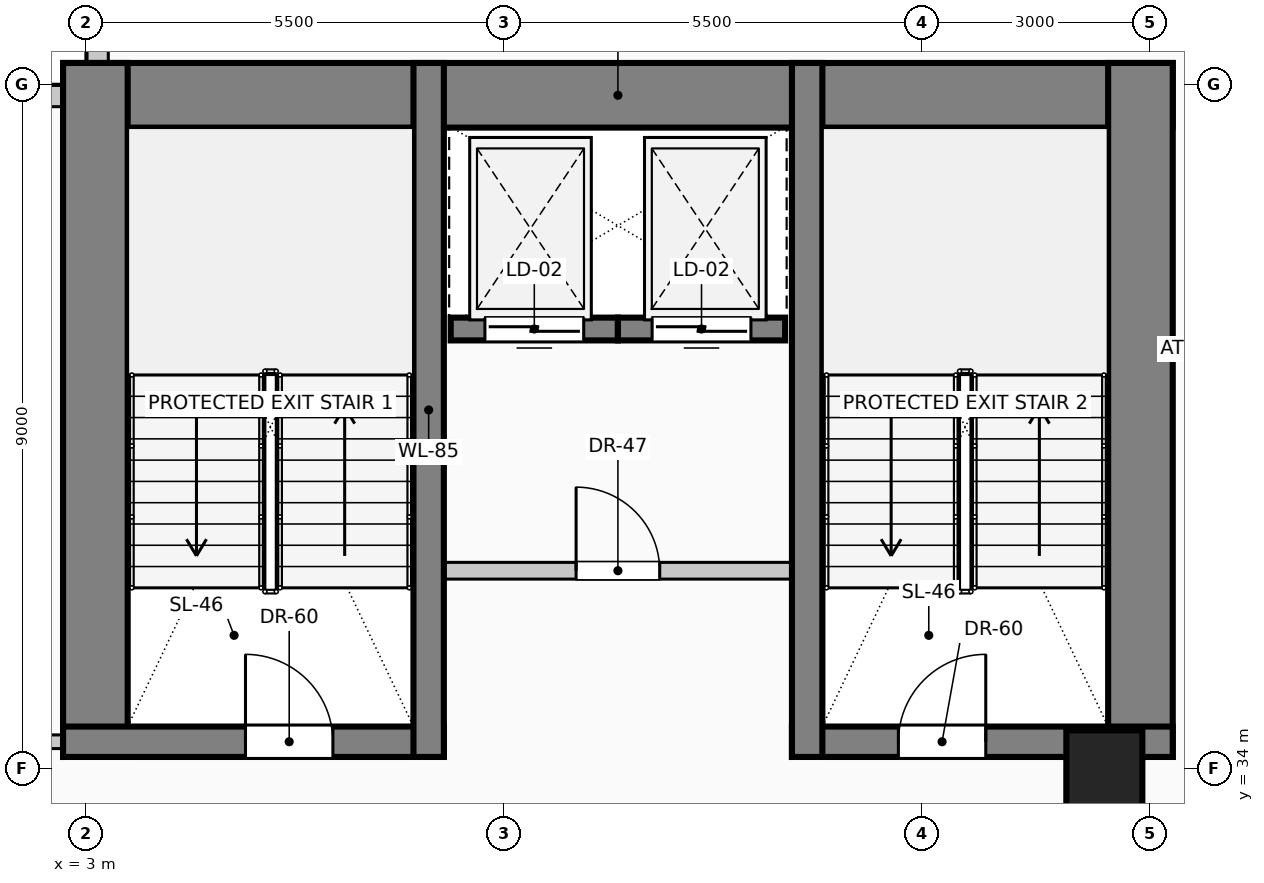
"""IFC4 building model, lengths in metres.
Left out: names, types, materials, properties, quantities, classifications, styles, units other than length and angle.
Written with IfcOpenShell. Run it as: python <this file> out.ifc"""

import sys

from ifc_helpers import new_model, si_unit, direction, frame, frame_2d, origin, origin_2d, place, context, subcontext, project, spatial, rectangle, circle, extrude, element, fill, save


model = new_model("IFC4")
c1 = context("Model", 3, precision=1e-05, world=origin(), true_north=direction((0.0, 1.0)))
c2 = subcontext(c1, "Body", "Model", "MODEL_VIEW")
j1 = project(units=[si_unit("LENGTHUNIT", "METRE"), si_unit("PLANEANGLEUNIT", "RADIAN")], contexts=[c1])
p1 = place(None, origin())
s1 = spatial("IfcSite", under=j1, at=p1, CompositionType="ELEMENT")
p2 = place(p1, origin())
s2 = spatial("IfcBuilding", under=s1, at=p2, CompositionType="ELEMENT")
p3 = place(p2, frame((0.0, 0.0, 132.6)))
s3 = spatial("IfcBuildingStorey", under=s2, at=p3, CompositionType="ELEMENT", Elevation=132.6)
p4 = place(p3, frame((2.7, 42.855, 0.0), z_axis=(0.0, 0.0, 1.0), x_axis=(1.0, 0.0, 0.0)))
e1 = element("IfcWall", 1, at=p4, inside=s3, PredefinedType="SHEAR", context=c2, shape_type="SweptSolid", body=[
    extrude(rectangle(XDim=14.6, YDim=0.85, at=frame_2d((7.3, 0.0))), origin(), (0.0, 0.0, 1.0), 4.0),
])
for number, where, z_axis, x_axis in (
    (2, (3.125, 34.15, 0.0), (0.0, 0.0, 1.0), (0.0, 1.0, 0.0)),
    (3, (16.875, 34.15, 0.0), (0.0, 0.0, 1.0), (0.0, 1.0, 0.0)),
):
    element("IfcWall", number, at=place(p3, frame(where, z_axis=z_axis, x_axis=x_axis)), inside=s3, PredefinedType="SHEAR", context=c2, shape_type="SweptSolid", body=[
        extrude(rectangle(XDim=9.13, YDim=0.85, at=frame_2d((4.565, 0.0))), origin(), (0.0, 0.0, 1.0), 4.0),
    ])
p5 = place(p3, frame((2.7, 34.35, 0.0), z_axis=(0.0, 0.0, 1.0), x_axis=(1.0, 0.0, 0.0)))
e4 = element("IfcWall", 4, at=p5, inside=s3, PredefinedType="SHEAR", context=c2, shape_type="SweptSolid", body=[
    extrude(rectangle(XDim=5.01, YDim=0.4, at=frame_2d((2.505, 0.0))), origin(), (0.0, 0.0, 1.0), 4.0),
])
p6 = place(p5, frame((2.4, 0.0, 0.0)))
e5 = element("IfcOpeningElement", 5, at=p6, cuts=e4, PredefinedType="OPENING", context=c2, shape_type="SweptSolid", body=[
    extrude(rectangle(XDim=1.15, YDim=2.2, at=frame_2d((0.575, 1.1))), frame((0.0, 0.21, 0.0), z_axis=(0.0, -1.0, 0.0), x_axis=(1.0, 0.0, 0.0)), (0.0, 0.0, 1.0), 0.42),
])
p7 = place(p3, frame((12.29, 34.35, 0.0), z_axis=(0.0, 0.0, 1.0), x_axis=(1.0, 0.0, 0.0)))
e6 = element("IfcWall", 6, at=p7, inside=s3, PredefinedType="SHEAR", context=c2, shape_type="SweptSolid", body=[
    extrude(rectangle(XDim=5.01, YDim=0.4, at=frame_2d((2.505, 0.0))), origin(), (0.0, 0.0, 1.0), 4.0),
])
p8 = place(p7, frame((1.4, 0.0, 0.0)))
e7 = element("IfcOpeningElement", 7, at=p8, cuts=e6, PredefinedType="OPENING", context=c2, shape_type="SweptSolid", body=[
    extrude(rectangle(XDim=1.15, YDim=2.2, at=frame_2d((0.575, 1.1))), frame((0.0, 0.21, 0.0), z_axis=(0.0, -1.0, 0.0), x_axis=(1.0, 0.0, 0.0)), (0.0, 0.0, 1.0), 0.42),
])
for number, where, z_axis, x_axis in (
    (8, (7.51, 34.15, 0.0), (0.0, 0.0, 1.0), (0.0, 1.0, 0.0)),
    (9, (12.49, 34.15, 0.0), (0.0, 0.0, 1.0), (0.0, 1.0, 0.0)),
):
    element("IfcWall", number, at=place(p3, frame(where, z_axis=z_axis, x_axis=x_axis)), inside=s3, PredefinedType="SHEAR", context=c2, shape_type="SweptSolid", body=[
        extrude(rectangle(XDim=9.13, YDim=0.4, at=frame_2d((4.565, 0.0))), origin(), (0.0, 0.0, 1.0), 4.0),
    ])
p9 = place(p3, frame((16.4, 34.0, 0.0), z_axis=(0.0, 0.0, 1.0), x_axis=(1.0, 0.0, 0.0)))
e10 = element("IfcColumn", 10, at=p9, inside=s3, PredefinedType="COLUMN", context=c2, shape_type="SweptSolid", body=[
    extrude(circle(Radius=0.5, at=origin_2d()), origin(), (0.0, 0.0, 1.0), 4.0),
])
p10 = place(p3, frame((0.6, 42.845, 0.0), z_axis=(0.0, 0.0, 1.0), x_axis=(1.0, 0.0, 0.0)))
e11 = element("IfcWall", 11, at=p10, inside=s3, PredefinedType="SOLIDWALL", context=c2, shape_type="SweptSolid", body=[
    extrude(rectangle(XDim=2.095, YDim=0.28, at=frame_2d((1.047, 0.0))), origin(), (0.0, 0.0, 1.0), 3.725),
])
p11 = place(p3, frame((3.155, 43.285, 0.0), z_axis=(0.0, 0.0, 1.0), x_axis=(0.0, 1.0, 0.0)))
e12 = element("IfcWall", 12, at=p11, inside=s3, PredefinedType="SOLIDWALL", context=c2, shape_type="SweptSolid", body=[
    extrude(rectangle(XDim=2.115, YDim=0.28, at=frame_2d((1.058, 0.0))), origin(), (0.0, 0.0, 1.0), 3.725),
])
p12 = place(p3, frame((10.0, 39.78, 0.0), z_axis=(0.0, 0.0, 1.0), x_axis=(-1.0, 0.0, 0.0)))
e13 = element("IfcWall", 13, at=p12, inside=s3, PredefinedType="SOLIDWALL", context=c2, shape_type="SweptSolid", body=[
    extrude(rectangle(XDim=2.2, YDim=0.3, at=frame_2d((1.1, 0.0))), origin(), (0.0, 0.0, 1.0), 4.0),
])
p13 = place(p12, frame((0.45, 0.0, 0.0)))
e14 = element("IfcOpeningElement", 14, at=p13, cuts=e13, PredefinedType="OPENING", context=c2, shape_type="SweptSolid", body=[
    extrude(rectangle(XDim=1.3, YDim=2.25, at=frame_2d((0.65, 1.125))), frame((0.0, 0.16, 0.0), z_axis=(0.0, -1.0, 0.0), x_axis=(1.0, 0.0, 0.0)), (0.0, 0.0, 1.0), 0.32),
])
p14 = place(p3, frame((12.2, 39.78, 0.0), z_axis=(0.0, 0.0, 1.0), x_axis=(-1.0, 0.0, 0.0)))
e15 = element("IfcWall", 15, at=p14, inside=s3, PredefinedType="SOLIDWALL", context=c2, shape_type="SweptSolid", body=[
    extrude(rectangle(XDim=2.2, YDim=0.3, at=frame_2d((1.1, 0.0))), origin(), (0.0, 0.0, 1.0), 4.0),
])
p15 = place(p14, frame((0.45, 0.0, 0.0)))
e16 = element("IfcOpeningElement", 16, at=p15, cuts=e15, PredefinedType="OPENING", context=c2, shape_type="SweptSolid", body=[
    extrude(rectangle(XDim=1.3, YDim=2.25, at=frame_2d((0.65, 1.125))), frame((0.0, 0.16, 0.0), z_axis=(0.0, -1.0, 0.0), x_axis=(1.0, 0.0, 0.0)), (0.0, 0.0, 1.0), 0.32),
])
p16 = place(p3, frame((7.51, 36.6, 0.0), z_axis=(0.0, 0.0, 1.0), x_axis=(1.0, 0.0, 0.0)))
e17 = element("IfcWall", 17, at=p16, inside=s3, PredefinedType="PARTITIONING", context=c2, shape_type="SweptSolid", body=[
    extrude(rectangle(XDim=4.98, YDim=0.22, at=frame_2d((2.49, 0.0))), origin(), (0.0, 0.0, 1.0), 3.725),
])
p17 = place(p16, frame((1.94, 0.0, 0.0)))
e18 = element("IfcOpeningElement", 18, at=p17, cuts=e17, PredefinedType="OPENING", context=c2, shape_type="SweptSolid", body=[
    extrude(rectangle(XDim=1.1, YDim=2.2, at=frame_2d((0.55, 1.1))), frame((0.0, 0.12, 0.0), z_axis=(0.0, -1.0, 0.0), x_axis=(1.0, 0.0, 0.0)), (0.0, 0.0, 1.0), 0.24),
])
p18 = place(p3, frame((1.175, 34.35, 0.0), z_axis=(0.0, 0.0, 1.0), x_axis=(1.0, 0.0, 0.0)))
e19 = element("IfcWall", 19, at=p18, inside=s3, PredefinedType="PARTITIONING", context=c2, shape_type="SweptSolid", body=[
    extrude(rectangle(XDim=1.525, YDim=0.18, at=frame_2d((0.762, 0.0))), origin(), (0.0, 0.0, 1.0), 3.725),
])
p19 = place(p13, origin())
e20 = element("IfcDoor", 20, at=p19, inside=s3, OperationType="SLIDING_TO_LEFT", PredefinedType="DOOR", context=c2, shape_type="SweptSolid", body=[
    extrude(rectangle(XDim=1.3, YDim=2.25, at=frame_2d((0.65, 1.125))), frame((0.0, 0.025, 0.0), z_axis=(0.0, -1.0, 0.0), x_axis=(1.0, 0.0, 0.0)), (0.0, 0.0, 1.0), 0.05),
])
fill(e14, e20)
p20 = place(p15, origin())
e21 = element("IfcDoor", 21, at=p20, inside=s3, OperationType="SLIDING_TO_RIGHT", PredefinedType="DOOR", context=c2, shape_type="SweptSolid", body=[
    extrude(rectangle(XDim=1.3, YDim=2.25, at=frame_2d((0.65, 1.125))), frame((0.0, 0.025, 0.0), z_axis=(0.0, -1.0, 0.0), x_axis=(1.0, 0.0, 0.0)), (0.0, 0.0, 1.0), 0.05),
])
fill(e16, e21)
p21 = place(p6, origin())
e22 = element("IfcDoor", 22, at=p21, inside=s3, OperationType="SINGLE_SWING_LEFT", PredefinedType="DOOR", context=c2, shape_type="SweptSolid", body=[
    extrude(rectangle(XDim=1.15, YDim=2.2, at=frame_2d((0.575, 1.1))), frame((0.0, 0.025, 0.0), z_axis=(0.0, -1.0, 0.0), x_axis=(1.0, 0.0, 0.0)), (0.0, 0.0, 1.0), 0.05),
])
fill(e5, e22)
p22 = place(p8, origin())
e23 = element("IfcDoor", 23, at=p22, inside=s3, OperationType="SINGLE_SWING_RIGHT", PredefinedType="DOOR", context=c2, shape_type="SweptSolid", body=[
    extrude(rectangle(XDim=1.15, YDim=2.2, at=frame_2d((0.575, 1.1))), frame((0.0, 0.025, 0.0), z_axis=(0.0, -1.0, 0.0), x_axis=(1.0, 0.0, 0.0)), (0.0, 0.0, 1.0), 0.05),
])
fill(e7, e23)
p23 = place(p17, origin())
e24 = element("IfcDoor", 24, at=p23, inside=s3, OperationType="SINGLE_SWING_LEFT", PredefinedType="DOOR", context=c2, shape_type="SweptSolid", body=[
    extrude(rectangle(XDim=1.1, YDim=2.2, at=frame_2d((0.55, 1.1))), frame((0.0, 0.025, 0.0), z_axis=(0.0, -1.0, 0.0), x_axis=(1.0, 0.0, 0.0)), (0.0, 0.0, 1.0), 0.05),
])
fill(e18, e24)
save(model, sys.argv[1])
